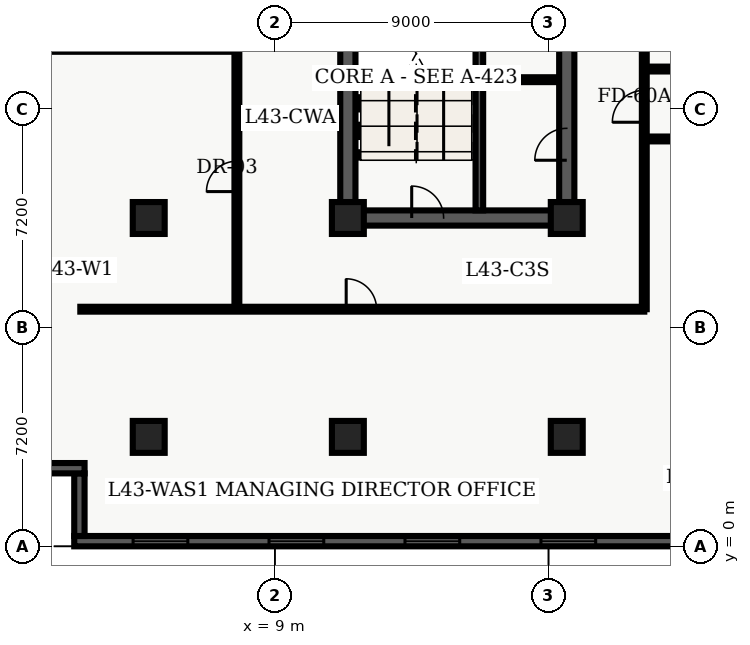
"""IFC4 building model, lengths in metres.
Left out: names, types, materials, properties, quantities, classifications, styles, units other than length and angle.
Written with IfcOpenShell. Run it as: python <this file> out.ifc"""

import sys

from ifc_helpers import new_model, entity, si_unit, converted_unit, direction, frame, origin_with_axes, origin_2d_with_axis, place, context, subcontext, project, spatial, polyline, rectangle, outline, extrude, element, fill, save


model = new_model("IFC4")
c1 = context("Model", 3, precision=1e-05, world=origin_with_axes(), true_north=direction((0.0, 1.0)))
c2 = subcontext(c1, "Body", "Model", "MODEL_VIEW")
j1 = project(units=[si_unit("LENGTHUNIT", "METRE"), converted_unit("PLANEANGLEUNIT", "DEGREE", entity("IfcPlaneAngleMeasure", 0.017), si_unit("PLANEANGLEUNIT", "RADIAN"), dimensions=[0, 0, 0, 0, 0, 0, 0])], contexts=[c1])
p1 = place(None, origin_with_axes())
s1 = spatial("IfcSite", under=j1, at=p1, CompositionType="ELEMENT")
p2 = place(p1, origin_with_axes())
s2 = spatial("IfcBuilding", under=s1, at=p2, CompositionType="ELEMENT")
p3 = place(p2, frame((0.0, 0.0, 175.8), z_axis=(0.0, 0.0, 1.0), x_axis=(1.0, 0.0, 0.0)))
s3 = spatial("IfcBuildingStorey", under=s2, at=p3, CompositionType="ELEMENT", Elevation=175.8)
p4 = place(p3, frame((11.4, 10.8, 0.0), z_axis=(0.0, 0.0, 1.0), x_axis=(0.0, 1.0, 0.0)))
e1 = element("IfcWall", 1, at=p4, inside=s3, PredefinedType="SHEAR", context=c2, shape_type="SweptSolid", body=[
    extrude(outline(polyline([(0.0, -0.25), (27.0, -0.25), (27.0, 0.25), (0.0, 0.25), (0.0, -0.25)])), origin_with_axes(), (0.0, 0.0, 1.0), 3.66),
])
p5 = place(p3, frame((11.4, 10.8, 0.0), z_axis=(0.0, 0.0, 1.0), x_axis=(1.0, 0.0, 0.0)))
e2 = element("IfcWall", 2, at=p5, inside=s3, PredefinedType="SHEAR", context=c2, shape_type="SweptSolid", body=[
    extrude(outline(polyline([(0.0, -0.25), (7.2, -0.25), (7.2, 0.25), (0.0, 0.25), (0.0, -0.25)])), origin_with_axes(), (0.0, 0.0, 1.0), 3.66),
])
p6 = place(p5, frame((2.625, 0.0, 0.0), z_axis=(0.0, 0.0, 1.0), x_axis=(1.0, 0.0, 0.0)))
e3 = element("IfcOpeningElement", 3, at=p6, cuts=e2, PredefinedType="OPENING", context=c2, shape_type="SweptSolid", body=[
    extrude(rectangle(XDim=1.05, YDim=0.52, at=origin_2d_with_axis()), origin_with_axes(), (0.0, 0.0, 1.0), 2.15),
])
p7 = place(p3, frame((18.6, 10.8, 0.0), z_axis=(0.0, 0.0, 1.0), x_axis=(0.0, 1.0, 0.0)))
e4 = element("IfcWall", 4, at=p7, inside=s3, PredefinedType="SHEAR", context=c2, shape_type="SweptSolid", body=[
    extrude(outline(polyline([(0.0, -0.25), (13.5, -0.25), (13.5, 0.25), (0.0, 0.25), (0.0, -0.25)])), origin_with_axes(), (0.0, 0.0, 1.0), 3.66),
])
p8 = place(p7, frame((11.125, 0.0, 0.0), z_axis=(0.0, 0.0, 1.0), x_axis=(1.0, 0.0, 0.0)))
e5 = element("IfcOpeningElement", 5, at=p8, cuts=e4, PredefinedType="OPENING", context=c2, shape_type="SweptSolid", body=[
    extrude(rectangle(XDim=1.05, YDim=0.52, at=origin_2d_with_axis()), origin_with_axes(), (0.0, 0.0, 1.0), 2.15),
])
p9 = place(p7, frame((2.425, 0.0, 0.0), z_axis=(0.0, 0.0, 1.0), x_axis=(1.0, 0.0, 0.0)))
e6 = element("IfcOpeningElement", 6, at=p9, cuts=e4, PredefinedType="OPENING", context=c2, shape_type="SweptSolid", body=[
    extrude(rectangle(XDim=1.05, YDim=0.52, at=origin_2d_with_axis()), origin_with_axes(), (0.0, 0.0, 1.0), 2.15),
])
p10 = place(p7, frame((6.725, 0.0, 0.0), z_axis=(0.0, 0.0, 1.0), x_axis=(1.0, 0.0, 0.0)))
e7 = element("IfcOpeningElement", 7, at=p10, cuts=e4, PredefinedType="OPENING", context=c2, shape_type="SweptSolid", body=[
    extrude(rectangle(XDim=1.05, YDim=0.52, at=origin_2d_with_axis()), origin_with_axes(), (0.0, 0.0, 1.0), 2.15),
])
p11 = place(p3, frame((15.725, 11.05, 0.0), z_axis=(0.0, 0.0, 1.0), x_axis=(0.0, 1.0, 0.0)))
e8 = element("IfcWall", 8, at=p11, inside=s3, PredefinedType="SHEAR", context=c2, shape_type="SweptSolid", body=[
    extrude(outline(polyline([(0.0, -0.125), (8.65, -0.125), (8.65, 0.125), (0.0, 0.125), (0.0, -0.125)])), origin_with_axes(), (0.0, 0.0, 1.0), 3.66),
])
for number, where, z_axis, x_axis in (
    (9, (11.4, 3.6, 0.0), (0.0, 0.0, 1.0), (1.0, 0.0, 0.0)),
    (10, (11.4, 10.8, 0.0), (0.0, 0.0, 1.0), (1.0, 0.0, 0.0)),
    (11, (18.6, 3.6, 0.0), (0.0, 0.0, 1.0), (1.0, 0.0, 0.0)),
    (12, (18.6, 10.8, 0.0), (0.0, 0.0, 1.0), (1.0, 0.0, 0.0)),
    (13, (4.85, 3.6, 0.0), (0.0, 0.0, 1.0), (1.0, 0.0, 0.0)),
    (14, (4.85, 10.8, 0.0), (0.0, 0.0, 1.0), (1.0, 0.0, 0.0)),
):
    element("IfcColumn", number, at=place(p3, frame(where, z_axis=z_axis, x_axis=x_axis)), inside=s3, PredefinedType="COLUMN", context=c2, shape_type="SweptSolid", body=[
        extrude(rectangle(XDim=1.05, YDim=1.05, at=origin_2d_with_axis()), origin_with_axes(), (0.0, 0.0, 1.0), 3.9),
    ])
p12 = place(p3, frame((15.84, 15.35, 0.0), z_axis=(0.0, 0.0, 1.0), x_axis=(1.0, 0.0, 0.0)))
e15 = element("IfcWall", 15, at=p12, inside=s3, PredefinedType="PARTITIONING", context=c2, shape_type="SweptSolid", body=[
    extrude(outline(polyline([(0.0, -0.08), (2.46, -0.08), (2.46, 0.08), (0.0, 0.08), (0.0, -0.08)])), origin_with_axes(), (0.0, 0.0, 1.0), 2.7),
])
p13 = place(p3, frame((2.6, 7.8, 0.0), z_axis=(0.0, 0.0, 1.0), x_axis=(1.0, 0.0, 0.0)))
e16 = element("IfcWall", 16, at=p13, inside=s3, PredefinedType="PARTITIONING", context=c2, shape_type="SweptSolid", body=[
    extrude(outline(polyline([(0.0, -0.08), (18.55, -0.08), (18.55, 0.08), (0.0, 0.08), (0.0, -0.08)])), origin_with_axes(), (0.0, 0.0, 1.0), 2.7),
])
p14 = place(p13, frame((9.245, 0.0, 0.0), z_axis=(0.0, 0.0, 1.0), x_axis=(1.0, 0.0, 0.0)))
e17 = element("IfcOpeningElement", 17, at=p14, cuts=e16, PredefinedType="OPENING", context=c2, shape_type="SweptSolid", body=[
    extrude(rectangle(XDim=1.0, YDim=0.18, at=origin_2d_with_axis()), origin_with_axes(), (0.0, 0.0, 1.0), 2.15),
])
p15 = place(p3, frame((21.15, 7.8, 0.0), z_axis=(0.0, 0.0, 1.0), x_axis=(0.0, 1.0, 0.0)))
e18 = element("IfcWall", 18, at=p15, inside=s3, PredefinedType="PARTITIONING", context=c2, shape_type="SweptSolid", body=[
    extrude(outline(polyline([(0.0, -0.08), (32.7, -0.08), (32.7, 0.08), (0.0, 0.08), (0.0, -0.08)])), origin_with_axes(), (0.0, 0.0, 1.0), 2.7),
])
p16 = place(p15, frame((16.557, 0.0, 0.0), z_axis=(0.0, 0.0, 1.0), x_axis=(1.0, 0.0, 0.0)))
e19 = element("IfcOpeningElement", 19, at=p16, cuts=e18, PredefinedType="OPENING", context=c2, shape_type="SweptSolid", body=[
    extrude(rectangle(XDim=1.0, YDim=0.18, at=origin_2d_with_axis()), origin_with_axes(), (0.0, 0.0, 1.0), 2.15),
])
p17 = place(p15, frame((22.185, 0.0, 0.0), z_axis=(0.0, 0.0, 1.0), x_axis=(1.0, 0.0, 0.0)))
e20 = element("IfcOpeningElement", 20, at=p17, cuts=e18, PredefinedType="OPENING", context=c2, shape_type="SweptSolid", body=[
    extrude(rectangle(XDim=1.0, YDim=0.18, at=origin_2d_with_axis()), origin_with_axes(), (0.0, 0.0, 1.0), 2.15),
])
p18 = place(p15, frame((26.91, 0.0, 0.0), z_axis=(0.0, 0.0, 1.0), x_axis=(1.0, 0.0, 0.0)))
e21 = element("IfcOpeningElement", 21, at=p18, cuts=e18, PredefinedType="OPENING", context=c2, shape_type="SweptSolid", body=[
    extrude(rectangle(XDim=1.0, YDim=0.18, at=origin_2d_with_axis()), origin_with_axes(), (0.0, 0.0, 1.0), 2.15),
])
p19 = place(p15, frame((30.602, 0.0, 0.0), z_axis=(0.0, 0.0, 1.0), x_axis=(1.0, 0.0, 0.0)))
e22 = element("IfcOpeningElement", 22, at=p19, cuts=e18, PredefinedType="OPENING", context=c2, shape_type="SweptSolid", body=[
    extrude(rectangle(XDim=1.0, YDim=0.18, at=origin_2d_with_axis()), origin_with_axes(), (0.0, 0.0, 1.0), 2.15),
])
p20 = place(p15, frame((6.675, 0.0, 0.0), z_axis=(0.0, 0.0, 1.0), x_axis=(1.0, 0.0, 0.0)))
e23 = element("IfcOpeningElement", 23, at=p20, cuts=e18, PredefinedType="OPENING", context=c2, shape_type="SweptSolid", body=[
    extrude(rectangle(XDim=1.05, YDim=0.18, at=origin_2d_with_axis()), origin_with_axes(), (0.0, 0.0, 1.0), 2.15),
])
p21 = place(p3, frame((7.75, 7.8, 0.0), z_axis=(0.0, 0.0, 1.0), x_axis=(0.0, 1.0, 0.0)))
e24 = element("IfcWall", 24, at=p21, inside=s3, PredefinedType="PARTITIONING", context=c2, shape_type="SweptSolid", body=[
    extrude(outline(polyline([(0.0, -0.08), (32.7, -0.08), (32.7, 0.08), (0.0, 0.08), (0.0, -0.08)])), origin_with_axes(), (0.0, 0.0, 1.0), 2.7),
])
p22 = place(p21, frame((4.369, 0.0, 0.0), z_axis=(0.0, 0.0, 1.0), x_axis=(1.0, 0.0, 0.0)))
e25 = element("IfcOpeningElement", 25, at=p22, cuts=e24, PredefinedType="OPENING", context=c2, shape_type="SweptSolid", body=[
    extrude(rectangle(XDim=1.0, YDim=0.18, at=origin_2d_with_axis()), origin_with_axes(), (0.0, 0.0, 1.0), 2.15),
])
p23 = place(p21, frame((13.998, 0.0, 0.0), z_axis=(0.0, 0.0, 1.0), x_axis=(1.0, 0.0, 0.0)))
e26 = element("IfcOpeningElement", 26, at=p23, cuts=e24, PredefinedType="OPENING", context=c2, shape_type="SweptSolid", body=[
    extrude(rectangle(XDim=1.0, YDim=0.18, at=origin_2d_with_axis()), origin_with_axes(), (0.0, 0.0, 1.0), 2.15),
])
p24 = place(p21, frame((25.979, 0.0, 0.0), z_axis=(0.0, 0.0, 1.0), x_axis=(1.0, 0.0, 0.0)))
e27 = element("IfcOpeningElement", 27, at=p24, cuts=e24, PredefinedType="OPENING", context=c2, shape_type="SweptSolid", body=[
    extrude(rectangle(XDim=1.0, YDim=0.18, at=origin_2d_with_axis()), origin_with_axes(), (0.0, 0.0, 1.0), 2.15),
])
p25 = place(p3, frame((21.15, 13.4, 0.0), z_axis=(0.0, 0.0, 1.0), x_axis=(1.0, 0.0, 0.0)))
e28 = element("IfcWall", 28, at=p25, inside=s3, PredefinedType="PARTITIONING", context=c2, shape_type="SweptSolid", body=[
    extrude(outline(polyline([(0.0, -0.08), (15.2, -0.08), (15.2, 0.08), (0.0, 0.08), (0.0, -0.08)])), origin_with_axes(), (0.0, 0.0, 1.0), 2.7),
])
p26 = place(p25, frame((7.65, 0.0, 0.0), z_axis=(0.0, 0.0, 1.0), x_axis=(1.0, 0.0, 0.0)))
e29 = element("IfcOpeningElement", 29, at=p26, cuts=e28, PredefinedType="OPENING", context=c2, shape_type="SweptSolid", body=[
    extrude(rectangle(XDim=1.2, YDim=0.18, at=origin_2d_with_axis()), origin_with_axes(), (0.0, 0.0, 1.0), 2.2),
])
p27 = place(p3, frame((21.15, 15.7, 0.0), z_axis=(0.0, 0.0, 1.0), x_axis=(1.0, 0.0, 0.0)))
e30 = element("IfcWall", 30, at=p27, inside=s3, PredefinedType="PARTITIONING", context=c2, shape_type="SweptSolid", body=[
    extrude(outline(polyline([(0.0, -0.08), (15.2, -0.08), (15.2, 0.08), (0.0, 0.08), (0.0, -0.08)])), origin_with_axes(), (0.0, 0.0, 1.0), 2.7),
])
p28 = place(p27, frame((2.31, 0.0, 0.0), z_axis=(0.0, 0.0, 1.0), x_axis=(1.0, 0.0, 0.0)))
e31 = element("IfcOpeningElement", 31, at=p28, cuts=e30, PredefinedType="OPENING", context=c2, shape_type="SweptSolid", body=[
    extrude(rectangle(XDim=1.0, YDim=0.18, at=origin_2d_with_axis()), origin_with_axes(), (0.0, 0.0, 1.0), 2.15),
])
p29 = place(p27, frame((6.909, 0.0, 0.0), z_axis=(0.0, 0.0, 1.0), x_axis=(1.0, 0.0, 0.0)))
e32 = element("IfcOpeningElement", 32, at=p29, cuts=e30, PredefinedType="OPENING", context=c2, shape_type="SweptSolid", body=[
    extrude(rectangle(XDim=1.0, YDim=0.18, at=origin_2d_with_axis()), origin_with_axes(), (0.0, 0.0, 1.0), 2.15),
])
p30 = place(p27, frame((12.249, 0.0, 0.0), z_axis=(0.0, 0.0, 1.0), x_axis=(1.0, 0.0, 0.0)))
e33 = element("IfcOpeningElement", 33, at=p30, cuts=e30, PredefinedType="OPENING", context=c2, shape_type="SweptSolid", body=[
    extrude(rectangle(XDim=1.0, YDim=0.18, at=origin_2d_with_axis()), origin_with_axes(), (0.0, 0.0, 1.0), 2.15),
])
p31 = place(p3, frame((57.26, 0.17, 0.0), z_axis=(0.0, 0.0, 1.0), x_axis=(-1.0, 0.0, 0.0)))
e34 = element("IfcWall", 34, at=p31, inside=s3, PredefinedType="SOLIDWALL", context=c2, shape_type="SweptSolid", body=[
    extrude(outline(polyline([(0.0, -0.17), (54.86, -0.17), (54.86, 0.17), (0.0, 0.17), (0.0, -0.17)])), origin_with_axes(), (0.0, 0.0, 1.0), 3.66),
])
p32 = place(p31, frame((2.836, 0.0, 0.45), z_axis=(0.0, 0.0, 1.0), x_axis=(1.0, 0.0, 0.0)))
e35 = element("IfcOpeningElement", 35, at=p32, cuts=e34, PredefinedType="OPENING", context=c2, shape_type="SweptSolid", body=[
    extrude(rectangle(XDim=1.8, YDim=0.36, at=origin_2d_with_axis()), origin_with_axes(), (0.0, 0.0, 1.0), 2.1),
])
p33 = place(p31, frame((7.307, 0.0, 0.45), z_axis=(0.0, 0.0, 1.0), x_axis=(1.0, 0.0, 0.0)))
e36 = element("IfcOpeningElement", 36, at=p33, cuts=e34, PredefinedType="OPENING", context=c2, shape_type="SweptSolid", body=[
    extrude(rectangle(XDim=1.8, YDim=0.36, at=origin_2d_with_axis()), origin_with_axes(), (0.0, 0.0, 1.0), 2.1),
])
p34 = place(p31, frame((11.779, 0.0, 0.45), z_axis=(0.0, 0.0, 1.0), x_axis=(1.0, 0.0, 0.0)))
e37 = element("IfcOpeningElement", 37, at=p34, cuts=e34, PredefinedType="OPENING", context=c2, shape_type="SweptSolid", body=[
    extrude(rectangle(XDim=1.8, YDim=0.36, at=origin_2d_with_axis()), origin_with_axes(), (0.0, 0.0, 1.0), 2.1),
])
p35 = place(p31, frame((16.251, 0.0, 0.45), z_axis=(0.0, 0.0, 1.0), x_axis=(1.0, 0.0, 0.0)))
e38 = element("IfcOpeningElement", 38, at=p35, cuts=e34, PredefinedType="OPENING", context=c2, shape_type="SweptSolid", body=[
    extrude(rectangle(XDim=1.8, YDim=0.36, at=origin_2d_with_axis()), origin_with_axes(), (0.0, 0.0, 1.0), 2.1),
])
p36 = place(p31, frame((20.723, 0.0, 0.45), z_axis=(0.0, 0.0, 1.0), x_axis=(1.0, 0.0, 0.0)))
e39 = element("IfcOpeningElement", 39, at=p36, cuts=e34, PredefinedType="OPENING", context=c2, shape_type="SweptSolid", body=[
    extrude(rectangle(XDim=1.8, YDim=0.36, at=origin_2d_with_axis()), origin_with_axes(), (0.0, 0.0, 1.0), 2.1),
])
p37 = place(p31, frame((25.194, 0.0, 0.45), z_axis=(0.0, 0.0, 1.0), x_axis=(1.0, 0.0, 0.0)))
e40 = element("IfcOpeningElement", 40, at=p37, cuts=e34, PredefinedType="OPENING", context=c2, shape_type="SweptSolid", body=[
    extrude(rectangle(XDim=1.8, YDim=0.36, at=origin_2d_with_axis()), origin_with_axes(), (0.0, 0.0, 1.0), 2.1),
])
p38 = place(p31, frame((29.666, 0.0, 0.45), z_axis=(0.0, 0.0, 1.0), x_axis=(1.0, 0.0, 0.0)))
e41 = element("IfcOpeningElement", 41, at=p38, cuts=e34, PredefinedType="OPENING", context=c2, shape_type="SweptSolid", body=[
    extrude(rectangle(XDim=1.8, YDim=0.36, at=origin_2d_with_axis()), origin_with_axes(), (0.0, 0.0, 1.0), 2.1),
])
p39 = place(p31, frame((34.138, 0.0, 0.45), z_axis=(0.0, 0.0, 1.0), x_axis=(1.0, 0.0, 0.0)))
e42 = element("IfcOpeningElement", 42, at=p39, cuts=e34, PredefinedType="OPENING", context=c2, shape_type="SweptSolid", body=[
    extrude(rectangle(XDim=1.8, YDim=0.36, at=origin_2d_with_axis()), origin_with_axes(), (0.0, 0.0, 1.0), 2.1),
])
p40 = place(p31, frame((38.609, 0.0, 0.45), z_axis=(0.0, 0.0, 1.0), x_axis=(1.0, 0.0, 0.0)))
e43 = element("IfcOpeningElement", 43, at=p40, cuts=e34, PredefinedType="OPENING", context=c2, shape_type="SweptSolid", body=[
    extrude(rectangle(XDim=1.8, YDim=0.36, at=origin_2d_with_axis()), origin_with_axes(), (0.0, 0.0, 1.0), 2.1),
])
p41 = place(p31, frame((43.081, 0.0, 0.45), z_axis=(0.0, 0.0, 1.0), x_axis=(1.0, 0.0, 0.0)))
e44 = element("IfcOpeningElement", 44, at=p41, cuts=e34, PredefinedType="OPENING", context=c2, shape_type="SweptSolid", body=[
    extrude(rectangle(XDim=1.8, YDim=0.36, at=origin_2d_with_axis()), origin_with_axes(), (0.0, 0.0, 1.0), 2.1),
])
p42 = place(p31, frame((47.553, 0.0, 0.45), z_axis=(0.0, 0.0, 1.0), x_axis=(1.0, 0.0, 0.0)))
e45 = element("IfcOpeningElement", 45, at=p42, cuts=e34, PredefinedType="OPENING", context=c2, shape_type="SweptSolid", body=[
    extrude(rectangle(XDim=1.8, YDim=0.36, at=origin_2d_with_axis()), origin_with_axes(), (0.0, 0.0, 1.0), 2.1),
])
p43 = place(p31, frame((52.024, 0.0, 0.45), z_axis=(0.0, 0.0, 1.0), x_axis=(1.0, 0.0, 0.0)))
e46 = element("IfcOpeningElement", 46, at=p43, cuts=e34, PredefinedType="OPENING", context=c2, shape_type="SweptSolid", body=[
    extrude(rectangle(XDim=1.8, YDim=0.36, at=origin_2d_with_axis()), origin_with_axes(), (0.0, 0.0, 1.0), 2.1),
])
p44 = place(p3, frame((2.57, 0.34, 0.0), z_axis=(0.0, 0.0, 1.0), x_axis=(0.0, 1.0, 0.0)))
e47 = element("IfcWall", 47, at=p44, inside=s3, PredefinedType="SOLIDWALL", context=c2, shape_type="SweptSolid", body=[
    extrude(outline(polyline([(0.0, -0.17), (2.06, -0.17), (2.06, 0.17), (0.0, 0.17), (0.0, -0.17)])), origin_with_axes(), (0.0, 0.0, 1.0), 3.66),
])
p45 = place(p3, frame((2.74, 2.57, 0.0), z_axis=(0.0, 0.0, 1.0), x_axis=(-1.0, 0.0, 0.0)))
e48 = element("IfcWall", 48, at=p45, inside=s3, PredefinedType="SOLIDWALL", context=c2, shape_type="SweptSolid", body=[
    extrude(outline(polyline([(0.0, -0.17), (2.74, -0.17), (2.74, 0.17), (0.0, 0.17), (0.0, -0.17)])), origin_with_axes(), (0.0, 0.0, 1.0), 3.66),
])
p46 = place(p5, frame((2.625, 0.0, 0.0), z_axis=(0.0, 0.0, 1.0), x_axis=(1.0, 0.0, 0.0)))
e49 = element("IfcDoor", 49, at=p46, inside=s3, OperationType="SINGLE_SWING_LEFT", PredefinedType="DOOR", context=c2, shape_type="SweptSolid", body=[
    extrude(rectangle(XDim=1.05, YDim=0.09, at=origin_2d_with_axis()), origin_with_axes(), (0.0, 0.0, 1.0), 2.15),
])
fill(e3, e49)
p47 = place(p7, frame((2.425, 0.0, 0.0), z_axis=(0.0, 0.0, 1.0), x_axis=(1.0, 0.0, 0.0)))
e50 = element("IfcDoor", 50, at=p47, inside=s3, OperationType="SINGLE_SWING_LEFT", PredefinedType="DOOR", context=c2, shape_type="SweptSolid", body=[
    extrude(rectangle(XDim=1.05, YDim=0.09, at=origin_2d_with_axis()), origin_with_axes(), (0.0, 0.0, 1.0), 2.15),
])
fill(e6, e50)
p48 = place(p21, frame((4.369, 0.0, 0.0), z_axis=(0.0, 0.0, 1.0), x_axis=(1.0, 0.0, 0.0)))
e51 = element("IfcDoor", 51, at=p48, inside=s3, OperationType="SINGLE_SWING_LEFT", PredefinedType="DOOR", context=c2, shape_type="SweptSolid", body=[
    extrude(rectangle(XDim=1.0, YDim=0.09, at=origin_2d_with_axis()), origin_with_axes(), (0.0, 0.0, 1.0), 2.15),
])
fill(e25, e51)
p49 = place(p13, frame((9.245, 0.0, 0.0), z_axis=(0.0, 0.0, 1.0), x_axis=(1.0, 0.0, 0.0)))
e52 = element("IfcDoor", 52, at=p49, inside=s3, OperationType="SINGLE_SWING_LEFT", PredefinedType="DOOR", context=c2, shape_type="SweptSolid", body=[
    extrude(rectangle(XDim=1.0, YDim=0.09, at=origin_2d_with_axis()), origin_with_axes(), (0.0, 0.0, 1.0), 2.15),
])
fill(e17, e52)
p50 = place(p15, frame((6.675, 0.0, 0.0), z_axis=(0.0, 0.0, 1.0), x_axis=(1.0, 0.0, 0.0)))
e53 = element("IfcDoor", 53, at=p50, inside=s3, OperationType="SINGLE_SWING_LEFT", PredefinedType="DOOR", context=c2, shape_type="SweptSolid", body=[
    extrude(rectangle(XDim=1.05, YDim=0.09, at=origin_2d_with_axis()), origin_with_axes(), (0.0, 0.0, 1.0), 2.15),
])
fill(e23, e53)
p51 = place(p31, frame((38.609, 0.0, 0.45), z_axis=(0.0, 0.0, 1.0), x_axis=(1.0, 0.0, 0.0)))
e54 = element("IfcWindow", 54, at=p51, inside=s3, PredefinedType="WINDOW", context=c2, shape_type="SweptSolid", body=[
    extrude(rectangle(XDim=1.8, YDim=0.09, at=origin_2d_with_axis()), origin_with_axes(), (0.0, 0.0, 1.0), 2.1),
])
fill(e43, e54)
p52 = place(p31, frame((43.081, 0.0, 0.45), z_axis=(0.0, 0.0, 1.0), x_axis=(1.0, 0.0, 0.0)))
e55 = element("IfcWindow", 55, at=p52, inside=s3, PredefinedType="WINDOW", context=c2, shape_type="SweptSolid", body=[
    extrude(rectangle(XDim=1.8, YDim=0.09, at=origin_2d_with_axis()), origin_with_axes(), (0.0, 0.0, 1.0), 2.1),
])
fill(e44, e55)
p53 = place(p31, frame((47.553, 0.0, 0.45), z_axis=(0.0, 0.0, 1.0), x_axis=(1.0, 0.0, 0.0)))
e56 = element("IfcWindow", 56, at=p53, inside=s3, PredefinedType="WINDOW", context=c2, shape_type="SweptSolid", body=[
    extrude(rectangle(XDim=1.8, YDim=0.09, at=origin_2d_with_axis()), origin_with_axes(), (0.0, 0.0, 1.0), 2.1),
])
fill(e45, e56)
p54 = place(p31, frame((52.024, 0.0, 0.45), z_axis=(0.0, 0.0, 1.0), x_axis=(1.0, 0.0, 0.0)))
e57 = element("IfcWindow", 57, at=p54, inside=s3, PredefinedType="WINDOW", context=c2, shape_type="SweptSolid", body=[
    extrude(rectangle(XDim=1.8, YDim=0.09, at=origin_2d_with_axis()), origin_with_axes(), (0.0, 0.0, 1.0), 2.1),
])
fill(e46, e57)
save(model, sys.argv[1])
